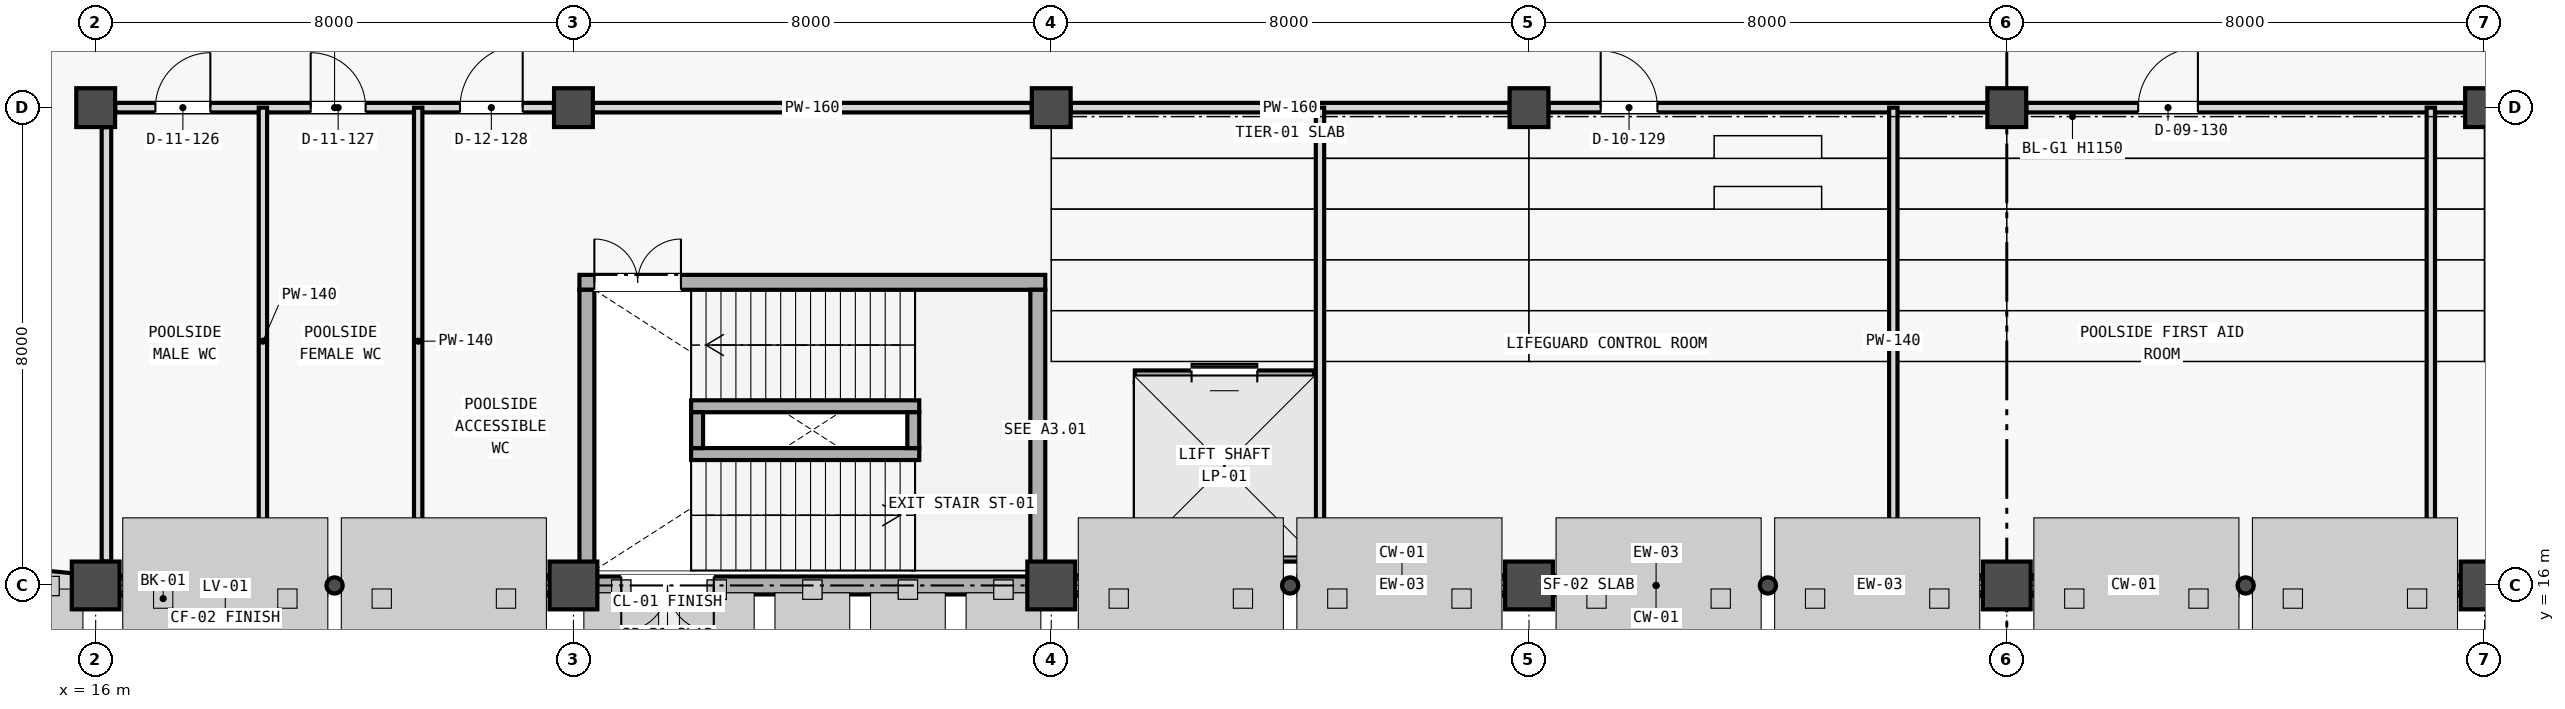
"""IFC4 building model, lengths in metres.
Left out: names, types, materials, properties, quantities, classifications, styles, units other than length and angle.
Written with IfcOpenShell. Run it as: python <this file> out.ifc"""

import sys

from ifc_helpers import new_model, si_unit, direction, frame, frame_2d, origin, origin_2d, place, context, subcontext, project, spatial, rectangle, hollow_circle, extrude, element, fill, save


model = new_model("IFC4")
c1 = context("Model", 3, precision=1e-05, world=origin(), true_north=direction((0.0, 1.0)))
c2 = subcontext(c1, "Body", "Model", "MODEL_VIEW")
j1 = project(units=[si_unit("LENGTHUNIT", "METRE"), si_unit("PLANEANGLEUNIT", "RADIAN")], contexts=[c1])
p1 = place(None, origin())
s1 = spatial("IfcSite", under=j1, at=p1, CompositionType="ELEMENT")
p2 = place(p1, origin())
s2 = spatial("IfcBuilding", under=s1, at=p2, CompositionType="ELEMENT")
p3 = place(p2, origin())
s3 = spatial("IfcBuildingStorey", under=s2, at=p3, CompositionType="ELEMENT", Elevation=0.0)
for number, where, z_axis, x_axis in (
    (1, (16.0, 16.0, 0.0), (0.0, 0.0, 1.0), (1.0, 0.0, 0.0)),
    (2, (24.0, 16.0, 0.0), (0.0, 0.0, 1.0), (1.0, 0.0, 0.0)),
    (3, (32.0, 16.0, 0.0), (0.0, 0.0, 1.0), (1.0, 0.0, 0.0)),
    (4, (40.0, 16.0, 0.0), (0.0, 0.0, 1.0), (1.0, 0.0, 0.0)),
    (5, (48.0, 16.0, 0.0), (0.0, 0.0, 1.0), (1.0, 0.0, 0.0)),
    (6, (56.0, 16.0, 0.0), (0.0, 0.0, 1.0), (1.0, 0.0, 0.0)),
):
    element("IfcColumn", number, at=place(p3, frame(where, z_axis=z_axis, x_axis=x_axis)), inside=s3, PredefinedType="COLUMN", context=c2, shape_type="SweptSolid", body=[
        extrude(rectangle(XDim=0.8, YDim=0.8, at=origin_2d()), origin(), (0.0, 0.0, 1.0), 5.125),
    ])
for number, where, z_axis, x_axis in (
    (7, (16.0, 24.0, 0.0), (0.0, 0.0, 1.0), (1.0, 0.0, 0.0)),
    (8, (24.0, 24.0, 0.0), (0.0, 0.0, 1.0), (1.0, 0.0, 0.0)),
    (9, (32.0, 24.0, 0.0), (0.0, 0.0, 1.0), (1.0, 0.0, 0.0)),
    (10, (40.0, 24.0, 0.0), (0.0, 0.0, 1.0), (1.0, 0.0, 0.0)),
    (11, (48.0, 24.0, 0.0), (0.0, 0.0, 1.0), (1.0, 0.0, 0.0)),
    (12, (56.0, 24.0, 0.0), (0.0, 0.0, 1.0), (1.0, 0.0, 0.0)),
):
    element("IfcColumn", number, at=place(p3, frame(where, z_axis=z_axis, x_axis=x_axis)), inside=s3, PredefinedType="COLUMN", context=c2, shape_type="SweptSolid", body=[
        extrude(rectangle(XDim=0.65, YDim=0.65, at=origin_2d()), origin(), (0.0, 0.0, 1.0), 5.125),
    ])
p4 = place(p3, frame((20.0, 16.0, 0.0), z_axis=(0.0, 0.0, 1.0), x_axis=(1.0, 0.0, 0.0)))
e13 = element("IfcColumn", 13, at=p4, inside=s3, PredefinedType="PILASTER", context=c2, shape_type="SweptSolid", body=[
    extrude(hollow_circle(Radius=0.136, WallThickness=0.012, at=origin_2d()), origin(), (0.0, 0.0, 1.0), 4.305),
])
for number, where, z_axis, x_axis in (
    (14, (16.396, 16.0, 0.0), (0.0, 0.0, 1.0), (1.0, 0.0, 0.0)),
    (15, (20.14, 16.0, 0.0), (0.0, 0.0, 1.0), (1.0, 0.0, 0.0)),
):
    element("IfcWall", number, at=place(p3, frame(where, z_axis=z_axis, x_axis=x_axis)), inside=s3, PredefinedType="STANDARD", context=c2, shape_type="SweptSolid", body=[
        extrude(rectangle(XDim=3.464, YDim=0.33, at=frame_2d((1.732, 0.0))), origin(), (0.0, 0.0, 1.0), 0.65),
    ])
p5 = place(p3, frame((24.396, 16.0, 0.0), z_axis=(0.0, 0.0, 1.0), x_axis=(1.0, 0.0, 0.0)))
e16 = element("IfcWall", 16, at=p5, inside=s3, PredefinedType="SHEAR", context=c2, shape_type="SweptSolid", body=[
    extrude(rectangle(XDim=7.208, YDim=0.3, at=frame_2d((3.604, 0.0))), origin(), (0.0, 0.0, 1.0), 5.4),
])
p6 = place(p5, frame((0.404, 0.0, 0.0)))
e17 = element("IfcOpeningElement", 17, at=p6, cuts=e16, PredefinedType="OPENING", context=c2, shape_type="SweptSolid", body=[
    extrude(rectangle(XDim=1.55, YDim=2.2, at=frame_2d((0.775, 1.1))), frame((0.0, 0.16, 0.0), z_axis=(0.0, -1.0, 0.0), x_axis=(1.0, 0.0, 0.0)), (0.0, 0.0, 1.0), 0.32),
])
p7 = place(p3, frame((36.0, 16.0, 0.0), z_axis=(0.0, 0.0, 1.0), x_axis=(1.0, 0.0, 0.0)))
e18 = element("IfcColumn", 18, at=p7, inside=s3, PredefinedType="PILASTER", context=c2, shape_type="SweptSolid", body=[
    extrude(hollow_circle(Radius=0.136, WallThickness=0.012, at=origin_2d()), origin(), (0.0, 0.0, 1.0), 4.305),
])
for number, where, z_axis, x_axis in (
    (19, (32.396, 16.0, 0.0), (0.0, 0.0, 1.0), (1.0, 0.0, 0.0)),
    (20, (36.14, 16.0, 0.0), (0.0, 0.0, 1.0), (1.0, 0.0, 0.0)),
):
    element("IfcWall", number, at=place(p3, frame(where, z_axis=z_axis, x_axis=x_axis)), inside=s3, PredefinedType="STANDARD", context=c2, shape_type="SweptSolid", body=[
        extrude(rectangle(XDim=3.464, YDim=0.33, at=frame_2d((1.732, 0.0))), origin(), (0.0, 0.0, 1.0), 0.65),
    ])
p8 = place(p3, frame((32.396, 16.0, 2.666), z_axis=(0.0, 0.0, 1.0), x_axis=(1.0, 0.0, 0.0)))
e21 = element("IfcWall", 21, at=p8, inside=s3, PredefinedType="STANDARD", context=c2, shape_type="SweptSolid", body=[
    extrude(rectangle(XDim=3.464, YDim=0.33, at=frame_2d((1.732, 0.0))), origin(), (0.0, 0.0, 1.0), 1.639),
])
p9 = place(p3, frame((44.0, 16.0, 0.0), z_axis=(0.0, 0.0, 1.0), x_axis=(1.0, 0.0, 0.0)))
e22 = element("IfcColumn", 22, at=p9, inside=s3, PredefinedType="PILASTER", context=c2, shape_type="SweptSolid", body=[
    extrude(hollow_circle(Radius=0.136, WallThickness=0.012, at=origin_2d()), origin(), (0.0, 0.0, 1.0), 4.305),
])
for number, where, z_axis, x_axis in (
    (23, (40.396, 16.0, 0.0), (0.0, 0.0, 1.0), (1.0, 0.0, 0.0)),
    (24, (44.14, 16.0, 0.0), (0.0, 0.0, 1.0), (1.0, 0.0, 0.0)),
):
    element("IfcWall", number, at=place(p3, frame(where, z_axis=z_axis, x_axis=x_axis)), inside=s3, PredefinedType="STANDARD", context=c2, shape_type="SweptSolid", body=[
        extrude(rectangle(XDim=3.464, YDim=0.33, at=frame_2d((1.732, 0.0))), origin(), (0.0, 0.0, 1.0), 0.65),
    ])
p10 = place(p3, frame((44.14, 16.0, 3.472), z_axis=(0.0, 0.0, 1.0), x_axis=(1.0, 0.0, 0.0)))
e25 = element("IfcWall", 25, at=p10, inside=s3, PredefinedType="STANDARD", context=c2, shape_type="SweptSolid", body=[
    extrude(rectangle(XDim=3.464, YDim=0.33, at=frame_2d((1.732, 0.0))), origin(), (0.0, 0.0, 1.0), 0.833),
])
p11 = place(p3, frame((52.0, 16.0, 0.0), z_axis=(0.0, 0.0, 1.0), x_axis=(1.0, 0.0, 0.0)))
e26 = element("IfcColumn", 26, at=p11, inside=s3, PredefinedType="PILASTER", context=c2, shape_type="SweptSolid", body=[
    extrude(hollow_circle(Radius=0.136, WallThickness=0.012, at=origin_2d()), origin(), (0.0, 0.0, 1.0), 4.305),
])
for number, where, z_axis, x_axis in (
    (27, (48.396, 16.0, 0.0), (0.0, 0.0, 1.0), (1.0, 0.0, 0.0)),
    (28, (52.14, 16.0, 0.0), (0.0, 0.0, 1.0), (1.0, 0.0, 0.0)),
):
    element("IfcWall", number, at=place(p3, frame(where, z_axis=z_axis, x_axis=x_axis)), inside=s3, PredefinedType="STANDARD", context=c2, shape_type="SweptSolid", body=[
        extrude(rectangle(XDim=3.464, YDim=0.33, at=frame_2d((1.732, 0.0))), origin(), (0.0, 0.0, 1.0), 0.65),
    ])
p12 = place(p3, frame((48.396, 16.0, 2.096), z_axis=(0.0, 0.0, 1.0), x_axis=(1.0, 0.0, 0.0)))
e29 = element("IfcWall", 29, at=p12, inside=s3, PredefinedType="STANDARD", context=c2, shape_type="SweptSolid", body=[
    extrude(rectangle(XDim=3.464, YDim=0.33, at=frame_2d((1.732, 0.0))), origin(), (0.0, 0.0, 1.0), 2.209),
])
p13 = place(p3, frame((52.14, 16.0, 2.549), z_axis=(0.0, 0.0, 1.0), x_axis=(1.0, 0.0, 0.0)))
e30 = element("IfcWall", 30, at=p13, inside=s3, PredefinedType="STANDARD", context=c2, shape_type="SweptSolid", body=[
    extrude(rectangle(XDim=3.464, YDim=0.33, at=frame_2d((1.732, 0.0))), origin(), (0.0, 0.0, 1.0), 1.756),
])
p14 = place(p3, frame((12.879, 16.307, 0.0), z_axis=(0.0, 0.0, 1.0), x_axis=(0.995186340733, -0.098000751113, 0.0)))
e31 = element("IfcWall", 31, at=p14, inside=s3, PredefinedType="STANDARD", context=c2, shape_type="SweptSolid", body=[
    extrude(rectangle(XDim=3.136, YDim=0.33, at=frame_2d((1.568, 0.0))), origin(), (0.0, 0.0, 1.0), 4.405),
])
p15 = place(p14, frame((1.068, 0.0, 1.05)))
e32 = element("IfcOpeningElement", 32, at=p15, cuts=e31, PredefinedType="OPENING", context=c2, shape_type="SweptSolid", body=[
    extrude(rectangle(XDim=1.0, YDim=1.6, at=frame_2d((0.5, 0.8))), frame((0.0, 0.175, 0.0), z_axis=(0.0, -1.0, 0.0), x_axis=(1.0, 0.0, 0.0)), (0.0, 0.0, 1.0), 0.35),
])
p16 = place(p3, frame((24.1, 21.075, 0.0), z_axis=(0.0, 0.0, 1.0), x_axis=(1.0, 0.0, 0.0)))
e33 = element("IfcWall", 33, at=p16, inside=s3, PredefinedType="SHEAR", context=c2, shape_type="SweptSolid", body=[
    extrude(rectangle(XDim=7.8, YDim=0.25, at=frame_2d((3.9, 0.0))), origin(), (0.0, 0.0, 1.0), 5.4),
])
p17 = place(p16, frame((0.25, 0.0, 0.0)))
e34 = element("IfcOpeningElement", 34, at=p17, cuts=e33, PredefinedType="OPENING", context=c2, shape_type="SweptSolid", body=[
    extrude(rectangle(XDim=1.45, YDim=2.2, at=frame_2d((0.725, 1.1))), frame((0.0, 0.135, 0.0), z_axis=(0.0, -1.0, 0.0), x_axis=(1.0, 0.0, 0.0)), (0.0, 0.0, 1.0), 0.27),
])
for number, where, z_axis, x_axis in (
    (35, (24.225, 16.25, 0.0), (0.0, 0.0, 1.0), (0.0, 1.0, 0.0)),
    (36, (31.775, 16.25, 0.0), (0.0, 0.0, 1.0), (0.0, 1.0, 0.0)),
):
    element("IfcWall", number, at=place(p3, frame(where, z_axis=z_axis, x_axis=x_axis)), inside=s3, PredefinedType="SHEAR", context=c2, shape_type="SweptSolid", body=[
        extrude(rectangle(XDim=4.7, YDim=0.25, at=frame_2d((2.35, 0.0))), origin(), (0.0, 0.0, 1.0), 5.4),
    ])
for number, where, z_axis, x_axis in (
    (37, (25.97, 18.2, 0.0), (0.0, 0.0, 1.0), (1.0, 0.0, 0.0)),
    (38, (25.97, 19.0, 0.0), (0.0, 0.0, 1.0), (1.0, 0.0, 0.0)),
):
    element("IfcWall", number, at=place(p3, frame(where, z_axis=z_axis, x_axis=x_axis)), inside=s3, PredefinedType="SHEAR", context=c2, shape_type="SweptSolid", body=[
        extrude(rectangle(XDim=3.82, YDim=0.2, at=frame_2d((1.91, 0.0))), origin(), (0.0, 0.0, 1.0), 5.4),
    ])
for number, where, z_axis, x_axis in (
    (39, (26.07, 18.3, 0.0), (0.0, 0.0, 1.0), (0.0, 1.0, 0.0)),
    (40, (29.69, 18.3, 0.0), (0.0, 0.0, 1.0), (0.0, 1.0, 0.0)),
):
    element("IfcWall", number, at=place(p3, frame(where, z_axis=z_axis, x_axis=x_axis)), inside=s3, PredefinedType="SHEAR", context=c2, shape_type="SweptSolid", body=[
        extrude(rectangle(XDim=0.6, YDim=0.2, at=frame_2d((0.3, 0.0))), origin(), (0.0, 0.0, 1.0), 5.4),
    ])
p18 = place(p3, frame((33.4, 16.5, 0.0), z_axis=(0.0, 0.0, 1.0), x_axis=(1.0, 0.0, 0.0)))
e41 = element("IfcWall", 41, at=p18, inside=s3, PredefinedType="SHEAR", context=c2, shape_type="SweptSolid", body=[
    extrude(rectangle(XDim=3.0, YDim=0.2, at=frame_2d((1.5, 0.0))), origin(), (0.0, 0.0, 1.0), 5.4),
])
p19 = place(p3, frame((33.4, 19.5, 0.0), z_axis=(0.0, 0.0, 1.0), x_axis=(1.0, 0.0, 0.0)))
e42 = element("IfcWall", 42, at=p19, inside=s3, PredefinedType="SHEAR", context=c2, shape_type="SweptSolid", body=[
    extrude(rectangle(XDim=3.0, YDim=0.2, at=frame_2d((1.5, 0.0))), origin(), (0.0, 0.0, 1.0), 5.4),
])
p20 = place(p19, frame((0.95, 0.0, 0.0)))
e43 = element("IfcOpeningElement", 43, at=p20, cuts=e42, PredefinedType="OPENING", context=c2, shape_type="SweptSolid", body=[
    extrude(rectangle(XDim=1.1, YDim=2.2, at=frame_2d((0.55, 1.1))), frame((0.0, 0.11, 0.0), z_axis=(0.0, -1.0, 0.0), x_axis=(1.0, 0.0, 0.0)), (0.0, 0.0, 1.0), 0.22),
])
for number, where, z_axis, x_axis in (
    (44, (33.5, 16.6, 0.0), (0.0, 0.0, 1.0), (0.0, 1.0, 0.0)),
    (45, (36.3, 16.6, 0.0), (0.0, 0.0, 1.0), (0.0, 1.0, 0.0)),
):
    element("IfcWall", number, at=place(p3, frame(where, z_axis=z_axis, x_axis=x_axis)), inside=s3, PredefinedType="SHEAR", context=c2, shape_type="SweptSolid", body=[
        extrude(rectangle(XDim=2.8, YDim=0.2, at=frame_2d((1.4, 0.0))), origin(), (0.0, 0.0, 1.0), 5.4),
    ])
p21 = place(p3, frame((16.327, 24.0, 0.0), z_axis=(0.0, 0.0, 1.0), x_axis=(1.0, 0.0, 0.0)))
e46 = element("IfcWall", 46, at=p21, inside=s3, PredefinedType="PARTITIONING", context=c2, shape_type="SweptSolid", body=[
    extrude(rectangle(XDim=7.346, YDim=0.16, at=frame_2d((3.673, 0.0))), origin(), (0.0, 0.0, 1.0), 4.355),
])
p22 = place(p21, frame((0.673, 0.0, 0.0)))
e47 = element("IfcOpeningElement", 47, at=p22, cuts=e46, PredefinedType="OPENING", context=c2, shape_type="SweptSolid", body=[
    extrude(rectangle(XDim=0.92, YDim=2.1, at=frame_2d((0.46, 1.05))), frame((0.0, 0.09, 0.0), z_axis=(0.0, -1.0, 0.0), x_axis=(1.0, 0.0, 0.0)), (0.0, 0.0, 1.0), 0.18),
])
p23 = place(p21, frame((3.273, 0.0, 0.0)))
e48 = element("IfcOpeningElement", 48, at=p23, cuts=e46, PredefinedType="OPENING", context=c2, shape_type="SweptSolid", body=[
    extrude(rectangle(XDim=0.92, YDim=2.1, at=frame_2d((0.46, 1.05))), frame((0.0, 0.09, 0.0), z_axis=(0.0, -1.0, 0.0), x_axis=(1.0, 0.0, 0.0)), (0.0, 0.0, 1.0), 0.18),
])
p24 = place(p21, frame((5.773, 0.0, 0.0)))
e49 = element("IfcOpeningElement", 49, at=p24, cuts=e46, PredefinedType="OPENING", context=c2, shape_type="SweptSolid", body=[
    extrude(rectangle(XDim=1.05, YDim=2.15, at=frame_2d((0.525, 1.075))), frame((0.0, 0.09, 0.0), z_axis=(0.0, -1.0, 0.0), x_axis=(1.0, 0.0, 0.0)), (0.0, 0.0, 1.0), 0.18),
])
for number, where, z_axis, x_axis in (
    (50, (24.327, 24.0, 0.0), (0.0, 0.0, 1.0), (1.0, 0.0, 0.0)),
    (51, (32.327, 24.0, 0.0), (0.0, 0.0, 1.0), (1.0, 0.0, 0.0)),
):
    element("IfcWall", number, at=place(p3, frame(where, z_axis=z_axis, x_axis=x_axis)), inside=s3, PredefinedType="PARTITIONING", context=c2, shape_type="SweptSolid", body=[
        extrude(rectangle(XDim=7.346, YDim=0.16, at=frame_2d((3.673, 0.0))), origin(), (0.0, 0.0, 1.0), 4.355),
    ])
p25 = place(p3, frame((40.327, 24.0, 0.0), z_axis=(0.0, 0.0, 1.0), x_axis=(1.0, 0.0, 0.0)))
e52 = element("IfcWall", 52, at=p25, inside=s3, PredefinedType="PARTITIONING", context=c2, shape_type="SweptSolid", body=[
    extrude(rectangle(XDim=7.346, YDim=0.16, at=frame_2d((3.673, 0.0))), origin(), (0.0, 0.0, 1.0), 4.355),
])
p26 = place(p25, frame((0.873, 0.0, 0.0)))
e53 = element("IfcOpeningElement", 53, at=p26, cuts=e52, PredefinedType="OPENING", context=c2, shape_type="SweptSolid", body=[
    extrude(rectangle(XDim=0.95, YDim=2.15, at=frame_2d((0.475, 1.075))), frame((0.0, 0.09, 0.0), z_axis=(0.0, -1.0, 0.0), x_axis=(1.0, 0.0, 0.0)), (0.0, 0.0, 1.0), 0.18),
])
p27 = place(p3, frame((48.327, 24.0, 0.0), z_axis=(0.0, 0.0, 1.0), x_axis=(1.0, 0.0, 0.0)))
e54 = element("IfcWall", 54, at=p27, inside=s3, PredefinedType="PARTITIONING", context=c2, shape_type="SweptSolid", body=[
    extrude(rectangle(XDim=7.346, YDim=0.16, at=frame_2d((3.673, 0.0))), origin(), (0.0, 0.0, 1.0), 4.355),
])
p28 = place(p27, frame((1.873, 0.0, 0.0)))
e55 = element("IfcOpeningElement", 55, at=p28, cuts=e54, PredefinedType="OPENING", context=c2, shape_type="SweptSolid", body=[
    extrude(rectangle(XDim=1.0, YDim=2.15, at=frame_2d((0.5, 1.075))), frame((0.0, 0.09, 0.0), z_axis=(0.0, -1.0, 0.0), x_axis=(1.0, 0.0, 0.0)), (0.0, 0.0, 1.0), 0.18),
])
p29 = place(p3, frame((16.18, 16.402, 0.0), z_axis=(0.0, 0.0, 1.0), x_axis=(0.0, 1.0, 0.0)))
e56 = element("IfcWall", 56, at=p29, inside=s3, PredefinedType="PARTITIONING", context=c2, shape_type="SweptSolid", body=[
    extrude(rectangle(XDim=7.271, YDim=0.16, at=frame_2d((3.635, 0.0))), origin(), (0.0, 0.0, 1.0), 4.405),
])
for number, where, z_axis, x_axis in (
    (57, (18.8, 16.18, 0.0), (0.0, 0.0, 1.0), (0.0, 1.0, 0.0)),
    (58, (21.4, 16.18, 0.0), (0.0, 0.0, 1.0), (0.0, 1.0, 0.0)),
    (59, (36.5, 16.18, 0.0), (0.0, 0.0, 1.0), (0.0, 1.0, 0.0)),
    (60, (46.1, 16.18, 0.0), (0.0, 0.0, 1.0), (0.0, 1.0, 0.0)),
    (61, (55.1, 16.18, 0.0), (0.0, 0.0, 1.0), (0.0, 1.0, 0.0)),
):
    element("IfcWall", number, at=place(p3, frame(where, z_axis=z_axis, x_axis=x_axis)), inside=s3, PredefinedType="PLUMBINGWALL", context=c2, shape_type="SweptSolid", body=[
        extrude(rectangle(XDim=7.82, YDim=0.14, at=frame_2d((3.91, 0.0))), origin(), (0.0, 0.0, 1.0), 4.305),
    ])
p30 = place(p6, frame((1.55, 0.0, 0.0), z_axis=(0.0, 0.0, 1.0), x_axis=(-1.0, 0.0, 0.0)))
e62 = element("IfcDoor", 62, at=p30, inside=s3, OperationType="DOUBLE_DOOR_SINGLE_SWING", PredefinedType="DOOR", context=c2, shape_type="SweptSolid", body=[
    extrude(rectangle(XDim=1.55, YDim=2.2, at=frame_2d((0.775, 1.1))), frame((0.0, 0.025, 0.0), z_axis=(0.0, -1.0, 0.0), x_axis=(1.0, 0.0, 0.0)), (0.0, 0.0, 1.0), 0.05),
])
fill(e17, e62)
p31 = place(p17, origin())
e63 = element("IfcDoor", 63, at=p31, inside=s3, OperationType="DOUBLE_DOOR_SINGLE_SWING", PredefinedType="DOOR", context=c2, shape_type="SweptSolid", body=[
    extrude(rectangle(XDim=1.45, YDim=2.2, at=frame_2d((0.725, 1.1))), frame((0.0, 0.025, 0.0), z_axis=(0.0, -1.0, 0.0), x_axis=(1.0, 0.0, 0.0)), (0.0, 0.0, 1.0), 0.05),
])
fill(e34, e63)
p32 = place(p20, origin())
e64 = element("IfcDoor", 64, at=p32, inside=s3, OperationType="SLIDING_TO_LEFT", PredefinedType="DOOR", context=c2, shape_type="SweptSolid", body=[
    extrude(rectangle(XDim=1.1, YDim=2.2, at=frame_2d((0.55, 1.1))), frame((0.0, 0.025, 0.0), z_axis=(0.0, -1.0, 0.0), x_axis=(1.0, 0.0, 0.0)), (0.0, 0.0, 1.0), 0.05),
])
fill(e43, e64)
p33 = place(p22, origin())
e65 = element("IfcDoor", 65, at=p33, inside=s3, OperationType="SINGLE_SWING_RIGHT", PredefinedType="DOOR", context=c2, shape_type="SweptSolid", body=[
    extrude(rectangle(XDim=0.92, YDim=2.1, at=frame_2d((0.46, 1.05))), frame((0.0, 0.025, 0.0), z_axis=(0.0, -1.0, 0.0), x_axis=(1.0, 0.0, 0.0)), (0.0, 0.0, 1.0), 0.05),
])
fill(e47, e65)
p34 = place(p23, origin())
e66 = element("IfcDoor", 66, at=p34, inside=s3, OperationType="SINGLE_SWING_LEFT", PredefinedType="DOOR", context=c2, shape_type="SweptSolid", body=[
    extrude(rectangle(XDim=0.92, YDim=2.1, at=frame_2d((0.46, 1.05))), frame((0.0, 0.025, 0.0), z_axis=(0.0, -1.0, 0.0), x_axis=(1.0, 0.0, 0.0)), (0.0, 0.0, 1.0), 0.05),
])
fill(e48, e66)
p35 = place(p24, origin())
e67 = element("IfcDoor", 67, at=p35, inside=s3, OperationType="SINGLE_SWING_RIGHT", PredefinedType="DOOR", context=c2, shape_type="SweptSolid", body=[
    extrude(rectangle(XDim=1.05, YDim=2.15, at=frame_2d((0.525, 1.075))), frame((0.0, 0.025, 0.0), z_axis=(0.0, -1.0, 0.0), x_axis=(1.0, 0.0, 0.0)), (0.0, 0.0, 1.0), 0.05),
])
fill(e49, e67)
p36 = place(p26, origin())
e68 = element("IfcDoor", 68, at=p36, inside=s3, OperationType="SINGLE_SWING_LEFT", PredefinedType="DOOR", context=c2, shape_type="SweptSolid", body=[
    extrude(rectangle(XDim=0.95, YDim=2.15, at=frame_2d((0.475, 1.075))), frame((0.0, 0.025, 0.0), z_axis=(0.0, -1.0, 0.0), x_axis=(1.0, 0.0, 0.0)), (0.0, 0.0, 1.0), 0.05),
])
fill(e53, e68)
p37 = place(p28, origin())
e69 = element("IfcDoor", 69, at=p37, inside=s3, OperationType="SINGLE_SWING_RIGHT", PredefinedType="DOOR", context=c2, shape_type="SweptSolid", body=[
    extrude(rectangle(XDim=1.0, YDim=2.15, at=frame_2d((0.5, 1.075))), frame((0.0, 0.025, 0.0), z_axis=(0.0, -1.0, 0.0), x_axis=(1.0, 0.0, 0.0)), (0.0, 0.0, 1.0), 0.05),
])
fill(e55, e69)
save(model, sys.argv[1])
